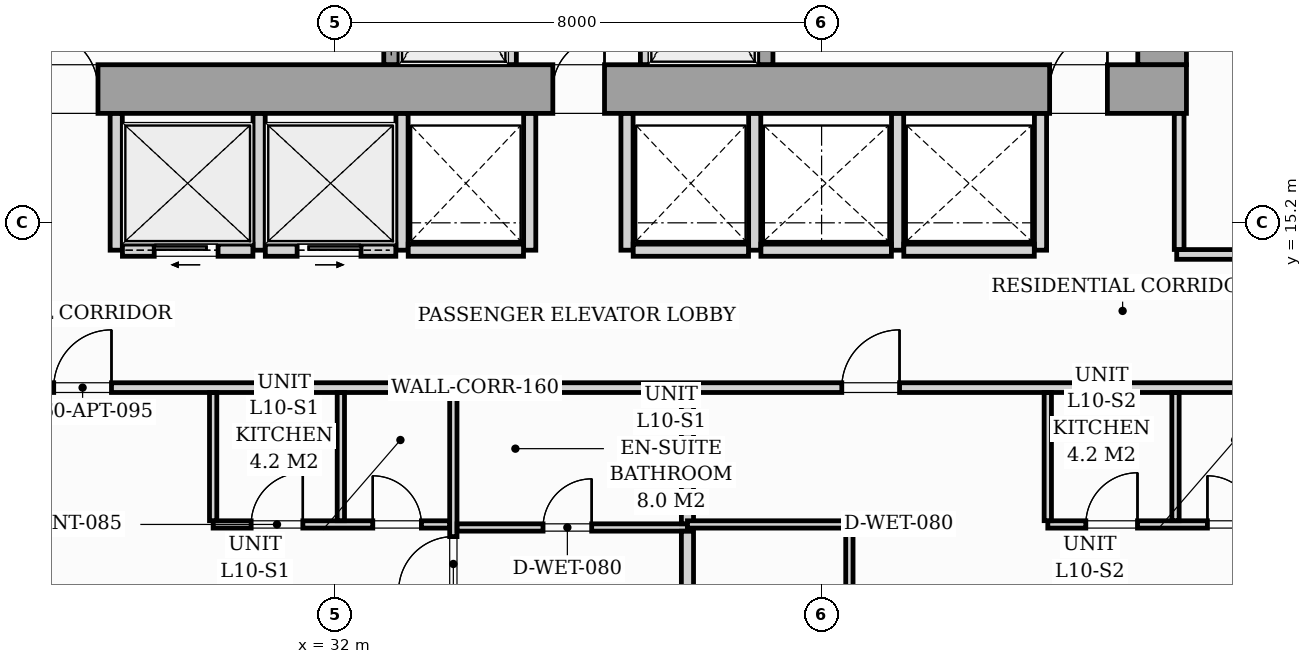
"""IFC4 building model, lengths in metres.
Left out: names, types, materials, properties, quantities, classifications, styles, units other than length and angle.
Written with IfcOpenShell. Run it as: python <this file> out.ifc"""

import sys

from ifc_helpers import new_model, si_unit, direction, frame, frame_2d, origin, origin_2d, place, context, subcontext, project, spatial, rectangle, i_section, extrude, source, transform, mapped, element, fill, save


model = new_model("IFC4")
c1 = context("Model", 3, precision=1e-05, world=origin(), true_north=direction((0.0, 1.0)))
c2 = subcontext(c1, "Body", "Model", "MODEL_VIEW")
j1 = project(units=[si_unit("LENGTHUNIT", "METRE"), si_unit("PLANEANGLEUNIT", "RADIAN")], contexts=[c1])
p1 = place(None, origin())
s1 = spatial("IfcSite", under=j1, at=p1, CompositionType="ELEMENT")
p2 = place(p1, origin())
s2 = spatial("IfcBuilding", under=s1, at=p2, CompositionType="ELEMENT")
p3 = place(p2, frame((0.0, 0.0, 39.0)))
s3 = spatial("IfcBuildingStorey", under=s2, at=p3, CompositionType="ELEMENT", Elevation=39.0)
m1 = source(origin(), c2, "Body", "SweptSolid", [
    extrude(i_section(OverallWidth=0.437, OverallDepth=0.514, WebThickness=0.061, FlangeThickness=0.097, FilletRadius=0.018, at=origin_2d()), origin(), (0.0, 0.0, 1.0), 3.196),
])
for number, where, z_axis, x_axis in (
    (1, (33.12, 17.4, 0.002), (0.0, 0.0, 1.0), (1.0, 0.0, 0.0)),
    (2, (38.88, 17.4, 0.002), (0.0, 0.0, 1.0), (1.0, 0.0, 0.0)),
    (3, (45.6, 17.4, 0.002), (0.0, 0.0, 1.0), (1.0, 0.0, 0.0)),
):
    element("IfcColumn", number, at=place(p3, frame(where, z_axis=z_axis, x_axis=x_axis)), inside=s3, PredefinedType="PILASTER", context=c2, shape_type="MappedRepresentation", body=[
        mapped(m1, transform((0.0, 0.0, 0.0), scale=1.0)),
    ])
p4 = place(p3, frame((26.0, 17.4, 0.0), z_axis=(0.0, 0.0, 1.0), x_axis=(1.0, 0.0, 0.0)))
e4 = element("IfcWall", 4, at=p4, inside=s3, PredefinedType="SHEAR", context=c2, shape_type="SweptSolid", body=[
    extrude(rectangle(XDim=20.0, YDim=0.8, at=frame_2d((10.0, 0.0))), origin(), (0.0, 0.0, 1.0), 3.2),
])
p5 = place(p4, frame((1.15, 0.0, 0.0)))
e5 = element("IfcOpeningElement", 5, at=p5, cuts=e4, PredefinedType="OPENING", context=c2, shape_type="SweptSolid", body=[
    extrude(rectangle(XDim=0.95, YDim=2.06, at=frame_2d((0.475, 1.03))), frame((0.0, 0.41, 0.0), z_axis=(0.0, -1.0, 0.0), x_axis=(1.0, 0.0, 0.0)), (0.0, 0.0, 1.0), 0.82),
])
p6 = place(p4, frame((9.58, 0.0, 0.0)))
e6 = element("IfcOpeningElement", 6, at=p6, cuts=e4, PredefinedType="OPENING", context=c2, shape_type="SweptSolid", body=[
    extrude(rectangle(XDim=0.85, YDim=2.0, at=frame_2d((0.425, 1.0))), frame((0.0, 0.41, 0.0), z_axis=(0.0, -1.0, 0.0), x_axis=(1.0, 0.0, 0.0)), (0.0, 0.0, 1.0), 0.82),
])
p7 = place(p4, frame((17.75, 0.0, 0.0)))
e7 = element("IfcOpeningElement", 7, at=p7, cuts=e4, PredefinedType="OPENING", context=c2, shape_type="SweptSolid", body=[
    extrude(rectangle(XDim=0.95, YDim=2.06, at=frame_2d((0.475, 1.03))), frame((0.0, 0.41, 0.0), z_axis=(0.0, -1.0, 0.0), x_axis=(1.0, 0.0, 0.0)), (0.0, 0.0, 1.0), 0.82),
])
p8 = place(p3, frame((45.6, 17.802, 0.0), z_axis=(0.0, 0.0, 1.0), x_axis=(0.0, 1.0, 0.0)))
e8 = element("IfcWall", 8, at=p8, inside=s3, PredefinedType="SHEAR", context=c2, shape_type="SweptSolid", body=[
    extrude(rectangle(XDim=5.796, YDim=0.8, at=frame_2d((2.898, 0.0))), origin(), (0.0, 0.0, 1.0), 3.2),
])
p9 = place(p3, frame((32.925, 17.802, 0.0), z_axis=(0.0, 0.0, 1.0), x_axis=(0.0, 1.0, 0.0)))
e9 = element("IfcWall", 9, at=p9, inside=s3, PredefinedType="SOLIDWALL", context=c2, shape_type="SweptSolid", body=[
    extrude(rectangle(XDim=2.646, YDim=0.25, at=frame_2d((1.323, 0.0))), origin(), (0.0, 0.0, 1.0), 3.2),
])
p10 = place(p9, frame((0.648, 0.0, 0.0)))
e10 = element("IfcOpeningElement", 10, at=p10, cuts=e9, PredefinedType="OPENING", context=c2, shape_type="SweptSolid", body=[
    extrude(rectangle(XDim=1.1, YDim=2.08, at=frame_2d((0.55, 1.04))), frame((0.0, 0.135, 0.0), z_axis=(0.0, -1.0, 0.0), x_axis=(1.0, 0.0, 0.0)), (0.0, 0.0, 1.0), 0.27),
])
for number, where, z_axis, x_axis in (
    (11, (34.9, 17.802, 0.0), (0.0, 0.0, 1.0), (0.0, 1.0, 0.0)),
    (12, (37.1, 17.802, 0.0), (0.0, 0.0, 1.0), (0.0, 1.0, 0.0)),
):
    element("IfcWall", number, at=place(p3, frame(where, z_axis=z_axis, x_axis=x_axis)), inside=s3, PredefinedType="PARTITIONING", context=c2, shape_type="SweptSolid", body=[
        extrude(rectangle(XDim=2.646, YDim=0.16, at=frame_2d((1.323, 0.0))), origin(), (0.0, 0.0, 1.0), 2.94),
    ])
p11 = place(p3, frame((39.075, 17.802, 0.0), z_axis=(0.0, 0.0, 1.0), x_axis=(0.0, 1.0, 0.0)))
e13 = element("IfcWall", 13, at=p11, inside=s3, PredefinedType="SOLIDWALL", context=c2, shape_type="SweptSolid", body=[
    extrude(rectangle(XDim=2.646, YDim=0.25, at=frame_2d((1.323, 0.0))), origin(), (0.0, 0.0, 1.0), 3.2),
])
p12 = place(p11, frame((0.648, 0.0, 0.0)))
e14 = element("IfcOpeningElement", 14, at=p12, cuts=e13, PredefinedType="OPENING", context=c2, shape_type="SweptSolid", body=[
    extrude(rectangle(XDim=1.1, YDim=2.08, at=frame_2d((0.55, 1.04))), frame((0.0, 0.135, 0.0), z_axis=(0.0, -1.0, 0.0), x_axis=(1.0, 0.0, 0.0)), (0.0, 0.0, 1.0), 0.27),
])
for number, where, z_axis, x_axis in (
    (15, (28.4, 14.75, 0.0), (0.0, 0.0, 1.0), (0.0, 1.0, 0.0)),
    (16, (30.75, 14.75, 0.0), (0.0, 0.0, 1.0), (0.0, 1.0, 0.0)),
    (17, (33.1, 14.75, 0.0), (0.0, 0.0, 1.0), (0.0, 1.0, 0.0)),
):
    element("IfcWall", number, at=place(p3, frame(where, z_axis=z_axis, x_axis=x_axis)), inside=s3, PredefinedType="PARTITIONING", context=c2, shape_type="SweptSolid", body=[
        extrude(rectangle(XDim=2.248, YDim=0.2, at=frame_2d((1.124, 0.0))), origin(), (0.0, 0.0, 1.0), 2.94),
    ])
p13 = place(p3, frame((28.502, 14.75, 0.0), z_axis=(0.0, 0.0, 1.0), x_axis=(1.0, 0.0, 0.0)))
e18 = element("IfcWall", 18, at=p13, inside=s3, PredefinedType="PARTITIONING", context=c2, shape_type="SweptSolid", body=[
    extrude(rectangle(XDim=2.146, YDim=0.2, at=frame_2d((1.073, 0.0))), origin(), (0.0, 0.0, 1.0), 2.94),
])
p14 = place(p13, frame((0.523, 0.0, 0.0)))
e19 = element("IfcOpeningElement", 19, at=p14, cuts=e18, PredefinedType="OPENING", context=c2, shape_type="SweptSolid", body=[
    extrude(rectangle(XDim=1.05, YDim=2.08, at=frame_2d((0.525, 1.04))), frame((0.0, 0.11, 0.0), z_axis=(0.0, -1.0, 0.0), x_axis=(1.0, 0.0, 0.0)), (0.0, 0.0, 1.0), 0.22),
])
p15 = place(p3, frame((30.852, 14.75, 0.0), z_axis=(0.0, 0.0, 1.0), x_axis=(1.0, 0.0, 0.0)))
e20 = element("IfcWall", 20, at=p15, inside=s3, PredefinedType="PARTITIONING", context=c2, shape_type="SweptSolid", body=[
    extrude(rectangle(XDim=2.146, YDim=0.2, at=frame_2d((1.073, 0.0))), origin(), (0.0, 0.0, 1.0), 2.94),
])
p16 = place(p15, frame((0.523, 0.0, 0.0)))
e21 = element("IfcOpeningElement", 21, at=p16, cuts=e20, PredefinedType="OPENING", context=c2, shape_type="SweptSolid", body=[
    extrude(rectangle(XDim=1.05, YDim=2.08, at=frame_2d((0.525, 1.04))), frame((0.0, 0.11, 0.0), z_axis=(0.0, -1.0, 0.0), x_axis=(1.0, 0.0, 0.0)), (0.0, 0.0, 1.0), 0.22),
])
p17 = place(p3, frame((35.2, 14.75, 0.0), z_axis=(0.0, 0.0, 1.0), x_axis=(0.0, 1.0, 0.0)))
e22 = element("IfcWall", 22, at=p17, inside=s3, PredefinedType="PARTITIONING", context=c2, shape_type="SweptSolid", body=[
    extrude(rectangle(XDim=2.248, YDim=0.2, at=frame_2d((1.124, 0.0))), origin(), (0.0, 0.0, 1.0), 2.94),
])
p18 = place(p3, frame((33.202, 14.75, 0.0), z_axis=(0.0, 0.0, 1.0), x_axis=(1.0, 0.0, 0.0)))
e23 = element("IfcWall", 23, at=p18, inside=s3, PredefinedType="PARTITIONING", context=c2, shape_type="SweptSolid", body=[
    extrude(rectangle(XDim=1.896, YDim=0.2, at=frame_2d((0.948, 0.0))), origin(), (0.0, 0.0, 1.0), 2.94),
])
for number, where, z_axis, x_axis in (
    (24, (36.8, 14.75, 0.0), (0.0, 0.0, 1.0), (0.0, 1.0, 0.0)),
    (25, (38.9, 14.75, 0.0), (0.0, 0.0, 1.0), (0.0, 1.0, 0.0)),
):
    element("IfcWall", number, at=place(p3, frame(where, z_axis=z_axis, x_axis=x_axis)), inside=s3, PredefinedType="PARTITIONING", context=c2, shape_type="SweptSolid", body=[
        extrude(rectangle(XDim=2.248, YDim=0.2, at=frame_2d((1.124, 0.0))), origin(), (0.0, 0.0, 1.0), 2.94),
    ])
p19 = place(p3, frame((36.902, 14.75, 0.0), z_axis=(0.0, 0.0, 1.0), x_axis=(1.0, 0.0, 0.0)))
e26 = element("IfcWall", 26, at=p19, inside=s3, PredefinedType="PARTITIONING", context=c2, shape_type="SweptSolid", body=[
    extrude(rectangle(XDim=1.896, YDim=0.2, at=frame_2d((0.948, 0.0))), origin(), (0.0, 0.0, 1.0), 2.94),
])
for number, where, z_axis, x_axis in (
    (27, (41.25, 14.75, 0.0), (0.0, 0.0, 1.0), (0.0, 1.0, 0.0)),
    (28, (43.6, 14.75, 0.0), (0.0, 0.0, 1.0), (0.0, 1.0, 0.0)),
):
    element("IfcWall", number, at=place(p3, frame(where, z_axis=z_axis, x_axis=x_axis)), inside=s3, PredefinedType="PARTITIONING", context=c2, shape_type="SweptSolid", body=[
        extrude(rectangle(XDim=2.248, YDim=0.2, at=frame_2d((1.124, 0.0))), origin(), (0.0, 0.0, 1.0), 2.94),
    ])
for number, where, z_axis, x_axis in (
    (29, (39.002, 14.75, 0.0), (0.0, 0.0, 1.0), (1.0, 0.0, 0.0)),
    (30, (41.352, 14.75, 0.0), (0.0, 0.0, 1.0), (1.0, 0.0, 0.0)),
):
    element("IfcWall", number, at=place(p3, frame(where, z_axis=z_axis, x_axis=x_axis)), inside=s3, PredefinedType="PARTITIONING", context=c2, shape_type="SweptSolid", body=[
        extrude(rectangle(XDim=2.146, YDim=0.2, at=frame_2d((1.073, 0.0))), origin(), (0.0, 0.0, 1.0), 2.94),
    ])
p20 = place(p3, frame((16.3, 12.49, 0.0), z_axis=(0.0, 0.0, 1.0), x_axis=(1.0, 0.0, 0.0)))
e31 = element("IfcWall", 31, at=p20, inside=s3, PredefinedType="PARTITIONING", context=c2, shape_type="SweptSolid", body=[
    extrude(rectangle(XDim=35.2, YDim=0.16, at=frame_2d((17.6, 0.0))), origin(), (0.0, 0.0, 1.0), 2.94),
])
p21 = place(p20, frame((11.072, 0.0, 0.0)))
e32 = element("IfcOpeningElement", 32, at=p21, cuts=e31, PredefinedType="OPENING", context=c2, shape_type="SweptSolid", body=[
    extrude(rectangle(XDim=0.95, YDim=2.06, at=frame_2d((0.475, 1.03))), frame((0.0, 0.09, 0.0), z_axis=(0.0, -1.0, 0.0), x_axis=(1.0, 0.0, 0.0)), (0.0, 0.0, 1.0), 0.18),
])
p22 = place(p20, frame((24.032, 0.0, 0.0)))
e33 = element("IfcOpeningElement", 33, at=p22, cuts=e31, PredefinedType="OPENING", context=c2, shape_type="SweptSolid", body=[
    extrude(rectangle(XDim=0.95, YDim=2.06, at=frame_2d((0.475, 1.03))), frame((0.0, 0.09, 0.0), z_axis=(0.0, -1.0, 0.0), x_axis=(1.0, 0.0, 0.0)), (0.0, 0.0, 1.0), 0.18),
])
p23 = place(p3, frame((33.944, 2.78, 0.0), z_axis=(0.0, 0.0, 1.0), x_axis=(0.0, 1.0, 0.0)))
e34 = element("IfcWall", 34, at=p23, inside=s3, PredefinedType="PARTITIONING", context=c2, shape_type="SweptSolid", body=[
    extrude(rectangle(XDim=9.628, YDim=0.12, at=frame_2d((4.814, 0.0))), origin(), (0.0, 0.0, 1.0), 2.94),
])
p24 = place(p23, frame((6.36, 0.0, 0.0)))
e35 = element("IfcOpeningElement", 35, at=p24, cuts=e34, PredefinedType="OPENING", context=c2, shape_type="SweptSolid", body=[
    extrude(rectangle(XDim=0.9, YDim=2.05, at=frame_2d((0.45, 1.025))), frame((0.0, 0.07, 0.0), z_axis=(0.0, -1.0, 0.0), x_axis=(1.0, 0.0, 0.0)), (0.0, 0.0, 1.0), 0.14),
])
p25 = place(p3, frame((29.994, 10.24, 0.0), z_axis=(0.0, 0.0, 1.0), x_axis=(1.0, 0.0, 0.0)))
e36 = element("IfcWall", 36, at=p25, inside=s3, PredefinedType="PARTITIONING", context=c2, shape_type="SweptSolid", body=[
    extrude(rectangle(XDim=3.888, YDim=0.12, at=frame_2d((1.944, 0.0))), origin(), (0.0, 0.0, 1.0), 2.94),
])
p26 = place(p25, frame((0.625, 0.0, 0.0)))
e37 = element("IfcOpeningElement", 37, at=p26, cuts=e36, PredefinedType="OPENING", context=c2, shape_type="SweptSolid", body=[
    extrude(rectangle(XDim=0.85, YDim=2.05, at=frame_2d((0.425, 1.025))), frame((0.0, 0.07, 0.0), z_axis=(0.0, -1.0, 0.0), x_axis=(1.0, 0.0, 0.0)), (0.0, 0.0, 1.0), 0.14),
])
p27 = place(p25, frame((2.625, 0.0, 0.0)))
e38 = element("IfcOpeningElement", 38, at=p27, cuts=e36, PredefinedType="OPENING", context=c2, shape_type="SweptSolid", body=[
    extrude(rectangle(XDim=0.8, YDim=2.02, at=frame_2d((0.4, 1.01))), frame((0.0, 0.07, 0.0), z_axis=(0.0, -1.0, 0.0), x_axis=(1.0, 0.0, 0.0)), (0.0, 0.0, 1.0), 0.14),
])
for number, where, z_axis, x_axis in (
    (39, (32.094, 10.302, 0.0), (0.0, 0.0, 1.0), (0.0, 1.0, 0.0)),
    (40, (29.994, 10.302, 0.0), (0.0, 0.0, 1.0), (0.0, 1.0, 0.0)),
):
    element("IfcWall", number, at=place(p3, frame(where, z_axis=z_axis, x_axis=x_axis)), inside=s3, PredefinedType="PARTITIONING", context=c2, shape_type="SweptSolid", body=[
        extrude(rectangle(XDim=2.106, YDim=0.12, at=frame_2d((1.053, 0.0))), origin(), (0.0, 0.0, 1.0), 2.94),
    ])
p28 = place(p3, frame((34.006, 10.19, 0.0), z_axis=(0.0, 0.0, 1.0), x_axis=(1.0, 0.0, 0.0)))
e41 = element("IfcWall", 41, at=p28, inside=s3, PredefinedType="PARTITIONING", context=c2, shape_type="SweptSolid", body=[
    extrude(rectangle(XDim=3.788, YDim=0.12, at=frame_2d((1.894, 0.0))), origin(), (0.0, 0.0, 1.0), 2.94),
])
p29 = place(p28, frame((1.413, 0.0, 0.0)))
e42 = element("IfcOpeningElement", 42, at=p29, cuts=e41, PredefinedType="OPENING", context=c2, shape_type="SweptSolid", body=[
    extrude(rectangle(XDim=0.8, YDim=2.02, at=frame_2d((0.4, 1.01))), frame((0.0, 0.07, 0.0), z_axis=(0.0, -1.0, 0.0), x_axis=(1.0, 0.0, 0.0)), (0.0, 0.0, 1.0), 0.14),
])
p30 = place(p3, frame((37.794, 2.78, 0.0), z_axis=(0.0, 0.0, 1.0), x_axis=(0.0, 1.0, 0.0)))
e43 = element("IfcWall", 43, at=p30, inside=s3, PredefinedType="PARTITIONING", context=c2, shape_type="SweptSolid", body=[
    extrude(rectangle(XDim=7.348, YDim=0.2, at=frame_2d((3.674, 0.0))), origin(), (0.0, 0.0, 1.0), 2.94),
])
p31 = place(p3, frame((37.794, 10.252, 0.0), z_axis=(0.0, 0.0, 1.0), x_axis=(0.0, 1.0, 0.0)))
e44 = element("IfcWall", 44, at=p31, inside=s3, PredefinedType="PARTITIONING", context=c2, shape_type="SweptSolid", body=[
    extrude(rectangle(XDim=2.156, YDim=0.2, at=frame_2d((1.078, 0.0))), origin(), (0.0, 0.0, 1.0), 2.94),
])
p32 = place(p3, frame((43.72, 10.24, 0.0), z_axis=(0.0, 0.0, 1.0), x_axis=(1.0, 0.0, 0.0)))
e45 = element("IfcWall", 45, at=p32, inside=s3, PredefinedType="PARTITIONING", context=c2, shape_type="SweptSolid", body=[
    extrude(rectangle(XDim=3.888, YDim=0.12, at=frame_2d((1.944, 0.0))), origin(), (0.0, 0.0, 1.0), 2.94),
])
p33 = place(p32, frame((0.625, 0.0, 0.0)))
e46 = element("IfcOpeningElement", 46, at=p33, cuts=e45, PredefinedType="OPENING", context=c2, shape_type="SweptSolid", body=[
    extrude(rectangle(XDim=0.85, YDim=2.05, at=frame_2d((0.425, 1.025))), frame((0.0, 0.07, 0.0), z_axis=(0.0, -1.0, 0.0), x_axis=(1.0, 0.0, 0.0)), (0.0, 0.0, 1.0), 0.14),
])
p34 = place(p32, frame((2.625, 0.0, 0.0)))
e47 = element("IfcOpeningElement", 47, at=p34, cuts=e45, PredefinedType="OPENING", context=c2, shape_type="SweptSolid", body=[
    extrude(rectangle(XDim=0.8, YDim=2.02, at=frame_2d((0.4, 1.01))), frame((0.0, 0.07, 0.0), z_axis=(0.0, -1.0, 0.0), x_axis=(1.0, 0.0, 0.0)), (0.0, 0.0, 1.0), 0.14),
])
for number, where, z_axis, x_axis in (
    (48, (45.82, 10.302, 0.0), (0.0, 0.0, 1.0), (0.0, 1.0, 0.0)),
    (49, (43.72, 10.302, 0.0), (0.0, 0.0, 1.0), (0.0, 1.0, 0.0)),
):
    element("IfcWall", number, at=place(p3, frame(where, z_axis=z_axis, x_axis=x_axis)), inside=s3, PredefinedType="PARTITIONING", context=c2, shape_type="SweptSolid", body=[
        extrude(rectangle(XDim=2.106, YDim=0.12, at=frame_2d((1.053, 0.0))), origin(), (0.0, 0.0, 1.0), 2.94),
    ])
p35 = place(p3, frame((40.457, 2.962, 0.0), z_axis=(0.0, 0.0, 1.0), x_axis=(0.0, 1.0, 0.0)))
e50 = element("IfcWall", 50, at=p35, inside=s3, PredefinedType="PARTITIONING", context=c2, shape_type="SweptSolid", body=[
    extrude(rectangle(XDim=7.278, YDim=0.12, at=frame_2d((3.639, 0.0))), origin(), (0.0, 0.0, 1.0), 2.94),
])
p36 = place(p35, frame((3.113, 0.0, 0.0)))
e51 = element("IfcOpeningElement", 51, at=p36, cuts=e50, PredefinedType="OPENING", context=c2, shape_type="SweptSolid", body=[
    extrude(rectangle(XDim=0.85, YDim=2.05, at=frame_2d((0.425, 1.025))), frame((0.0, 0.07, 0.0), z_axis=(0.0, -1.0, 0.0), x_axis=(1.0, 0.0, 0.0)), (0.0, 0.0, 1.0), 0.14),
])
p37 = place(p3, frame((37.794, 10.24, 0.0), z_axis=(0.0, 0.0, 1.0), x_axis=(1.0, 0.0, 0.0)))
e52 = element("IfcWall", 52, at=p37, inside=s3, PredefinedType="PARTITIONING", context=c2, shape_type="SweptSolid", body=[
    extrude(rectangle(XDim=2.601, YDim=0.12, at=frame_2d((1.301, 0.0))), origin(), (0.0, 0.0, 1.0), 2.94),
])
p38 = place(p3, frame((45.84, 14.68, 0.0), z_axis=(0.0, 0.0, 1.0), x_axis=(1.0, 0.0, 0.0)))
e53 = element("IfcWall", 53, at=p38, inside=s3, PredefinedType="PARTITIONING", context=c2, shape_type="SweptSolid", body=[
    extrude(rectangle(XDim=5.578, YDim=0.16, at=frame_2d((2.789, 0.0))), origin(), (0.0, 0.0, 1.0), 2.94),
])
p39 = place(p38, frame((2.415, 0.0, 0.0)))
e54 = element("IfcOpeningElement", 54, at=p39, cuts=e53, PredefinedType="OPENING", context=c2, shape_type="SweptSolid", body=[
    extrude(rectangle(XDim=0.95, YDim=2.06, at=frame_2d((0.475, 1.03))), frame((0.0, 0.09, 0.0), z_axis=(0.0, -1.0, 0.0), x_axis=(1.0, 0.0, 0.0)), (0.0, 0.0, 1.0), 0.18),
])
p40 = place(p3, frame((45.88, 14.762, 0.0), z_axis=(0.0, 0.0, 1.0), x_axis=(0.0, 1.0, 0.0)))
e55 = element("IfcWall", 55, at=p40, inside=s3, PredefinedType="PARTITIONING", context=c2, shape_type="SweptSolid", body=[
    extrude(rectangle(XDim=2.236, YDim=0.16, at=frame_2d((1.118, 0.0))), origin(), (0.0, 0.0, 1.0), 2.94),
])
m2 = source(origin(), c2, "Body", "SweptSolid", [
    extrude(rectangle(XDim=0.95, YDim=2.06, at=frame_2d((0.475, 1.03))), frame((0.0, 0.025, 0.0), z_axis=(0.0, -1.0, 0.0), x_axis=(1.0, 0.0, 0.0)), (0.0, 0.0, 1.0), 0.05),
])
p41 = place(p5, origin())
e56 = element("IfcDoor", 56, at=p41, inside=s3, OperationType="SINGLE_SWING_LEFT", PredefinedType="DOOR", context=c2, shape_type="MappedRepresentation", body=[
    mapped(m2, transform((0.0, 0.0, 0.0), scale=1.0)),
])
fill(e5, e56)
m3 = source(origin(), c2, "Body", "SweptSolid", [
    extrude(rectangle(XDim=0.85, YDim=2.0, at=frame_2d((0.425, 1.0))), frame((0.0, 0.025, 0.0), z_axis=(0.0, -1.0, 0.0), x_axis=(1.0, 0.0, 0.0)), (0.0, 0.0, 1.0), 0.05),
])
p42 = place(p6, origin())
e57 = element("IfcDoor", 57, at=p42, inside=s3, OperationType="SINGLE_SWING_RIGHT", PredefinedType="DOOR", context=c2, shape_type="MappedRepresentation", body=[
    mapped(m3, transform((0.0, 0.0, 0.0), scale=1.0)),
])
fill(e6, e57)
p43 = place(p7, origin())
e58 = element("IfcDoor", 58, at=p43, inside=s3, OperationType="SINGLE_SWING_RIGHT", PredefinedType="DOOR", context=c2, shape_type="MappedRepresentation", body=[
    mapped(m2, transform((0.0, 0.0, 0.0), scale=1.0)),
])
fill(e7, e58)
m4 = source(origin(), c2, "Body", "SweptSolid", [
    extrude(rectangle(XDim=1.05, YDim=2.08, at=frame_2d((0.525, 1.04))), frame((0.0, 0.025, 0.0), z_axis=(0.0, -1.0, 0.0), x_axis=(1.0, 0.0, 0.0)), (0.0, 0.0, 1.0), 0.05),
])
p44 = place(p14, origin())
e59 = element("IfcDoor", 59, at=p44, inside=s3, OperationType="SLIDING_TO_LEFT", PredefinedType="DOOR", context=c2, shape_type="MappedRepresentation", body=[
    mapped(m4, transform((0.0, 0.0, 0.0), scale=1.0)),
])
fill(e19, e59)
p45 = place(p16, origin())
e60 = element("IfcDoor", 60, at=p45, inside=s3, OperationType="SLIDING_TO_RIGHT", PredefinedType="DOOR", context=c2, shape_type="MappedRepresentation", body=[
    mapped(m4, transform((0.0, 0.0, 0.0), scale=1.0)),
])
fill(e21, e60)
m5 = source(origin(), c2, "Body", "SweptSolid", [
    extrude(rectangle(XDim=0.8, YDim=2.02, at=frame_2d((0.4, 1.01))), frame((0.0, 0.025, 0.0), z_axis=(0.0, -1.0, 0.0), x_axis=(1.0, 0.0, 0.0)), (0.0, 0.0, 1.0), 0.05),
])
p46 = place(p29, origin())
e61 = element("IfcDoor", 61, at=p46, inside=s3, OperationType="SINGLE_SWING_RIGHT", PredefinedType="DOOR", context=c2, shape_type="MappedRepresentation", body=[
    mapped(m5, transform((0.0, 0.0, 0.0), scale=1.0)),
])
fill(e42, e61)
m6 = source(origin(), c2, "Body", "SweptSolid", [
    extrude(rectangle(XDim=0.95, YDim=2.06, at=frame_2d((0.475, 1.03))), frame((0.0, 0.025, 0.0), z_axis=(0.0, -1.0, 0.0), x_axis=(1.0, 0.0, 0.0)), (0.0, 0.0, 1.0), 0.05),
])
p47 = place(p21, origin())
e62 = element("IfcDoor", 62, at=p47, inside=s3, OperationType="SINGLE_SWING_RIGHT", PredefinedType="DOOR", context=c2, shape_type="MappedRepresentation", body=[
    mapped(m6, transform((0.0, 0.0, 0.0), scale=1.0)),
])
fill(e32, e62)
m7 = source(origin(), c2, "Body", "SweptSolid", [
    extrude(rectangle(XDim=0.9, YDim=2.05, at=frame_2d((0.45, 1.025))), frame((0.0, 0.025, 0.0), z_axis=(0.0, -1.0, 0.0), x_axis=(1.0, 0.0, 0.0)), (0.0, 0.0, 1.0), 0.05),
])
p48 = place(p24, origin())
e63 = element("IfcDoor", 63, at=p48, inside=s3, OperationType="SINGLE_SWING_LEFT", PredefinedType="DOOR", context=c2, shape_type="MappedRepresentation", body=[
    mapped(m7, transform((0.0, 0.0, 0.0), scale=1.0)),
])
fill(e35, e63)
m8 = source(origin(), c2, "Body", "SweptSolid", [
    extrude(rectangle(XDim=0.85, YDim=2.05, at=frame_2d((0.425, 1.025))), frame((0.0, 0.025, 0.0), z_axis=(0.0, -1.0, 0.0), x_axis=(1.0, 0.0, 0.0)), (0.0, 0.0, 1.0), 0.05),
])
p49 = place(p26, origin())
e64 = element("IfcDoor", 64, at=p49, inside=s3, OperationType="SINGLE_SWING_RIGHT", PredefinedType="DOOR", context=c2, shape_type="MappedRepresentation", body=[
    mapped(m8, transform((0.0, 0.0, 0.0), scale=1.0)),
])
fill(e37, e64)
p50 = place(p27, origin())
e65 = element("IfcDoor", 65, at=p50, inside=s3, OperationType="SINGLE_SWING_LEFT", PredefinedType="DOOR", context=c2, shape_type="MappedRepresentation", body=[
    mapped(m5, transform((0.0, 0.0, 0.0), scale=1.0)),
])
fill(e38, e65)
p51 = place(p22, origin())
e66 = element("IfcDoor", 66, at=p51, inside=s3, OperationType="SINGLE_SWING_RIGHT", PredefinedType="DOOR", context=c2, shape_type="MappedRepresentation", body=[
    mapped(m6, transform((0.0, 0.0, 0.0), scale=1.0)),
])
fill(e33, e66)
p52 = place(p33, origin())
e67 = element("IfcDoor", 67, at=p52, inside=s3, OperationType="SINGLE_SWING_RIGHT", PredefinedType="DOOR", context=c2, shape_type="MappedRepresentation", body=[
    mapped(m8, transform((0.0, 0.0, 0.0), scale=1.0)),
])
fill(e46, e67)
p53 = place(p34, origin())
e68 = element("IfcDoor", 68, at=p53, inside=s3, OperationType="SINGLE_SWING_LEFT", PredefinedType="DOOR", context=c2, shape_type="MappedRepresentation", body=[
    mapped(m5, transform((0.0, 0.0, 0.0), scale=1.0)),
])
fill(e47, e68)
save(model, sys.argv[1])
